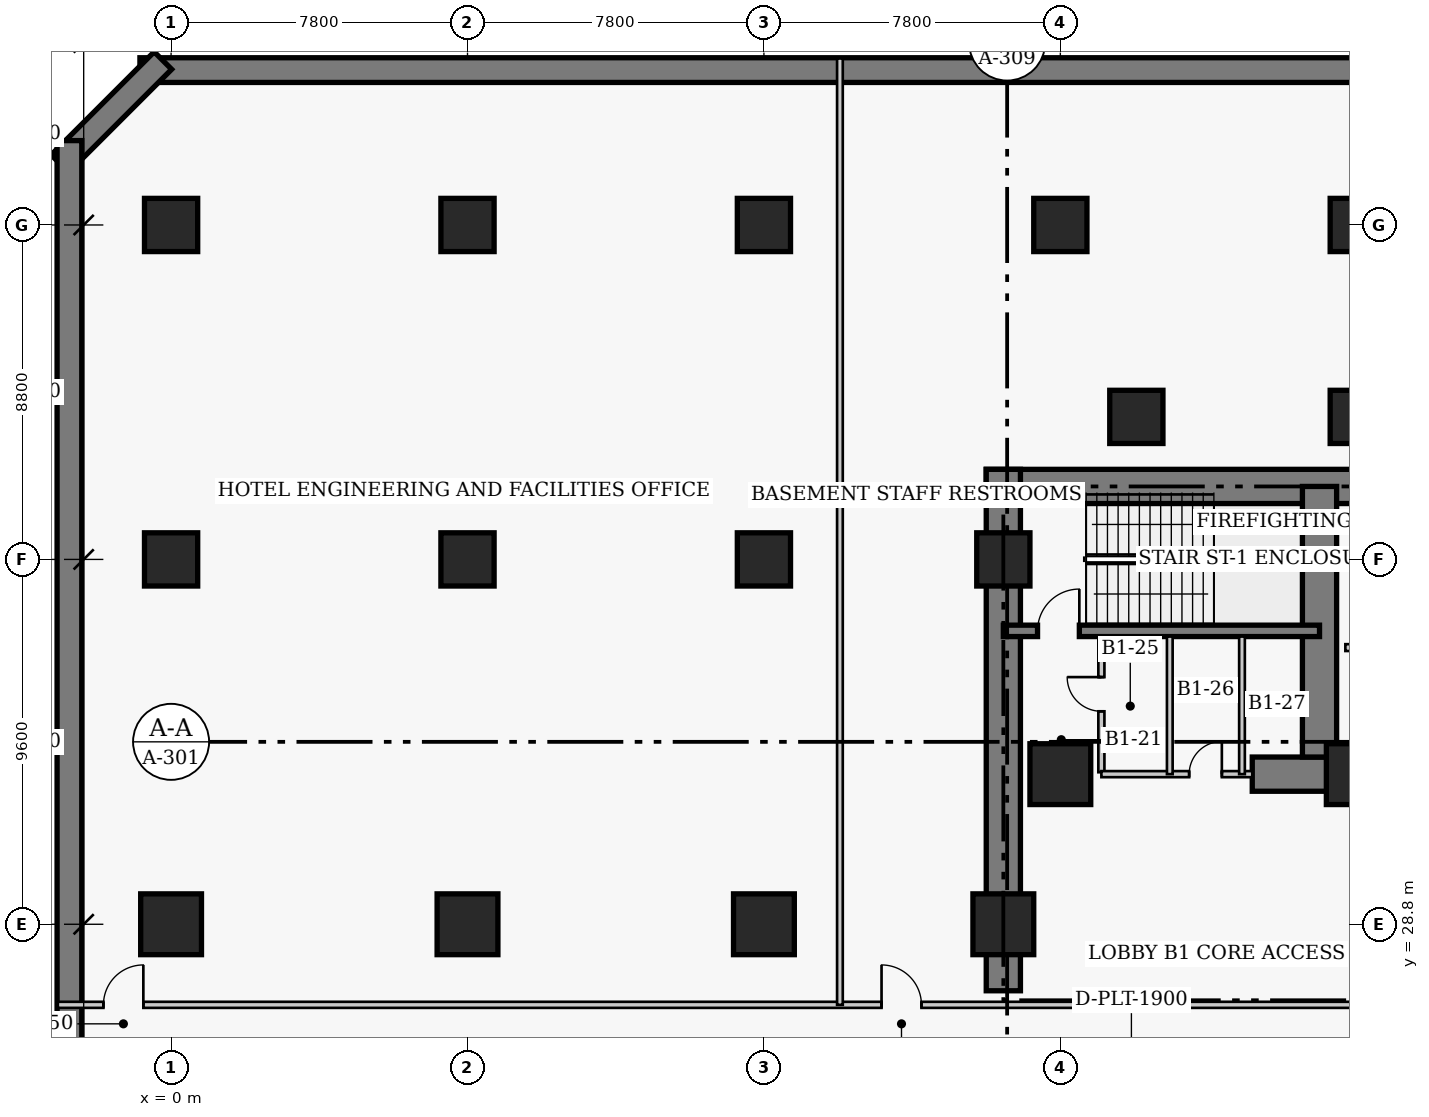
"""IFC4 building model, lengths in metres.
Left out: names, types, materials, properties, quantities, classifications, styles, units other than length and angle.
Written with IfcOpenShell. Run it as: python <this file> out.ifc"""

import sys

from ifc_helpers import new_model, si_unit, direction, frame, frame_2d, origin, origin_2d, place, context, subcontext, project, spatial, rectangle, extrude, element, fill, save


model = new_model("IFC4")
c1 = context("Model", 3, precision=1e-05, world=origin(), true_north=direction((0.0, 1.0)))
c2 = subcontext(c1, "Body", "Model", "MODEL_VIEW")
j1 = project(units=[si_unit("LENGTHUNIT", "METRE"), si_unit("PLANEANGLEUNIT", "RADIAN")], contexts=[c1])
p1 = place(None, origin())
s1 = spatial("IfcSite", under=j1, at=p1, CompositionType="ELEMENT")
p2 = place(p1, origin())
s2 = spatial("IfcBuilding", under=s1, at=p2, CompositionType="ELEMENT")
p3 = place(p2, frame((0.0, 0.0, -4.5)))
s3 = spatial("IfcBuildingStorey", under=s2, at=p3, CompositionType="ELEMENT", Elevation=-4.5)
p4 = place(p3, frame((78.82, 51.275, 0.0), z_axis=(0.0, 0.0, 1.0), x_axis=(-1.0, 0.0, 0.0)))
e1 = element("IfcWall", 1, at=p4, inside=s3, PredefinedType="USERDEFINED", context=c2, shape_type="SweptSolid", body=[
    extrude(rectangle(XDim=79.64, YDim=0.65, at=frame_2d((39.82, 0.0))), origin(), (0.0, 0.0, 1.0), 4.15),
])
p5 = place(p3, frame((-0.215, 51.526, 0.0), z_axis=(0.0, 0.0, 1.0), x_axis=(-0.707106781187, -0.707106781187, 0.0)))
e2 = element("IfcWall", 2, at=p5, inside=s3, PredefinedType="USERDEFINED", context=c2, shape_type="SweptSolid", body=[
    extrude(rectangle(XDim=3.834, YDim=0.65, at=frame_2d((1.917, 0.0))), origin(), (0.0, 0.0, 1.0), 4.15),
])
p6 = place(p3, frame((-2.675, 49.42, 0.0), z_axis=(0.0, 0.0, 1.0), x_axis=(0.0, -1.0, 0.0)))
e3 = element("IfcWall", 3, at=p6, inside=s3, PredefinedType="USERDEFINED", context=c2, shape_type="SweptSolid", body=[
    extrude(rectangle(XDim=46.84, YDim=0.65, at=frame_2d((23.42, 0.0))), origin(), (0.0, 0.0, 1.0), 4.15),
])
p7 = place(p3, frame((21.45, 40.32, 0.0), z_axis=(0.0, 0.0, 1.0), x_axis=(1.0, 0.0, 0.0)))
e4 = element("IfcWall", 4, at=p7, inside=s3, PredefinedType="SHEAR", context=c2, shape_type="SweptSolid", body=[
    extrude(rectangle(XDim=14.4, YDim=0.9, at=frame_2d((7.2, 0.0))), origin(), (0.0, 0.0, 1.0), 4.5),
])
p8 = place(p3, frame((21.9, 27.05, 0.0), z_axis=(0.0, 0.0, 1.0), x_axis=(0.0, 1.0, 0.0)))
e5 = element("IfcWall", 5, at=p8, inside=s3, PredefinedType="SHEAR", context=c2, shape_type="SweptSolid", body=[
    extrude(rectangle(XDim=13.72, YDim=0.9, at=frame_2d((6.86, 0.0))), origin(), (0.0, 0.0, 1.0), 4.5),
])
p9 = place(p3, frame((28.45, 32.75, 0.0), z_axis=(0.0, 0.0, 1.0), x_axis=(1.0, 0.0, 0.0)))
e6 = element("IfcWall", 6, at=p9, inside=s3, PredefinedType="SHEAR", context=c2, shape_type="SweptSolid", body=[
    extrude(rectangle(XDim=2.4, YDim=0.9, at=frame_2d((1.2, 0.0))), origin(), (0.0, 0.0, 1.0), 4.5),
])
p10 = place(p3, frame((30.22, 33.2, 0.0), z_axis=(0.0, 0.0, 1.0), x_axis=(0.0, 1.0, 0.0)))
e7 = element("IfcWall", 7, at=p10, inside=s3, PredefinedType="SHEAR", context=c2, shape_type="SweptSolid", body=[
    extrude(rectangle(XDim=7.12, YDim=0.9, at=frame_2d((3.56, 0.0))), origin(), (0.0, 0.0, 1.0), 4.5),
])
p11 = place(p3, frame((21.9, 36.52, 0.0), z_axis=(0.0, 0.0, 1.0), x_axis=(1.0, 0.0, 0.0)))
e8 = element("IfcWall", 8, at=p11, inside=s3, PredefinedType="SHEAR", context=c2, shape_type="SweptSolid", body=[
    extrude(rectangle(XDim=8.32, YDim=0.3, at=frame_2d((4.16, 0.0))), origin(), (0.0, 0.0, 1.0), 4.5),
])
p12 = place(p11, frame((0.9, 0.0, 0.0)))
e9 = element("IfcOpeningElement", 9, at=p12, cuts=e8, PredefinedType="OPENING", context=c2, shape_type="SweptSolid", body=[
    extrude(rectangle(XDim=1.1, YDim=2.15, at=frame_2d((0.55, 1.075))), frame((0.0, 0.16, 0.0), z_axis=(0.0, -1.0, 0.0), x_axis=(1.0, 0.0, 0.0)), (0.0, 0.0, 1.0), 0.32),
])
p13 = place(p3, frame((0.0, 28.8, 0.0), z_axis=(0.0, 0.0, 1.0), x_axis=(1.0, 0.0, 0.0)))
e10 = element("IfcColumn", 10, at=p13, inside=s3, PredefinedType="COLUMN", context=c2, shape_type="SweptSolid", body=[
    extrude(rectangle(XDim=1.6, YDim=1.6, at=origin_2d()), origin(), (0.0, 0.0, 1.0), 4.5),
])
for number, where, z_axis, x_axis in (
    (11, (0.0, 38.4, 0.0), (0.0, 0.0, 1.0), (1.0, 0.0, 0.0)),
    (12, (0.0, 47.2, 0.0), (0.0, 0.0, 1.0), (1.0, 0.0, 0.0)),
):
    element("IfcColumn", number, at=place(p3, frame(where, z_axis=z_axis, x_axis=x_axis)), inside=s3, PredefinedType="COLUMN", context=c2, shape_type="SweptSolid", body=[
        extrude(rectangle(XDim=1.4, YDim=1.4, at=origin_2d()), origin(), (0.0, 0.0, 1.0), 4.5),
    ])
p14 = place(p3, frame((7.8, 28.8, 0.0), z_axis=(0.0, 0.0, 1.0), x_axis=(1.0, 0.0, 0.0)))
e13 = element("IfcColumn", 13, at=p14, inside=s3, PredefinedType="COLUMN", context=c2, shape_type="SweptSolid", body=[
    extrude(rectangle(XDim=1.6, YDim=1.6, at=origin_2d()), origin(), (0.0, 0.0, 1.0), 4.5),
])
for number, where, z_axis, x_axis in (
    (14, (7.8, 38.4, 0.0), (0.0, 0.0, 1.0), (1.0, 0.0, 0.0)),
    (15, (7.8, 47.2, 0.0), (0.0, 0.0, 1.0), (1.0, 0.0, 0.0)),
):
    element("IfcColumn", number, at=place(p3, frame(where, z_axis=z_axis, x_axis=x_axis)), inside=s3, PredefinedType="COLUMN", context=c2, shape_type="SweptSolid", body=[
        extrude(rectangle(XDim=1.4, YDim=1.4, at=origin_2d()), origin(), (0.0, 0.0, 1.0), 4.5),
    ])
p15 = place(p3, frame((15.6, 28.8, 0.0), z_axis=(0.0, 0.0, 1.0), x_axis=(1.0, 0.0, 0.0)))
e16 = element("IfcColumn", 16, at=p15, inside=s3, PredefinedType="COLUMN", context=c2, shape_type="SweptSolid", body=[
    extrude(rectangle(XDim=1.6, YDim=1.6, at=origin_2d()), origin(), (0.0, 0.0, 1.0), 4.5),
])
for number, where, z_axis, x_axis in (
    (17, (15.6, 38.4, 0.0), (0.0, 0.0, 1.0), (1.0, 0.0, 0.0)),
    (18, (15.6, 47.2, 0.0), (0.0, 0.0, 1.0), (1.0, 0.0, 0.0)),
    (19, (23.4, 47.2, 0.0), (0.0, 0.0, 1.0), (1.0, 0.0, 0.0)),
    (20, (31.2, 47.2, 0.0), (0.0, 0.0, 1.0), (1.0, 0.0, 0.0)),
):
    element("IfcColumn", number, at=place(p3, frame(where, z_axis=z_axis, x_axis=x_axis)), inside=s3, PredefinedType="COLUMN", context=c2, shape_type="SweptSolid", body=[
        extrude(rectangle(XDim=1.4, YDim=1.4, at=origin_2d()), origin(), (0.0, 0.0, 1.0), 4.5),
    ])
p16 = place(p3, frame((21.9, 28.8, 0.0), z_axis=(0.0, 0.0, 1.0), x_axis=(1.0, 0.0, 0.0)))
e21 = element("IfcColumn", 21, at=p16, inside=s3, PredefinedType="COLUMN", context=c2, shape_type="SweptSolid", body=[
    extrude(rectangle(XDim=1.6, YDim=1.6, at=origin_2d()), origin(), (0.0, 0.0, 1.0), 4.5),
])
p17 = place(p3, frame((21.9, 38.4, 0.0), z_axis=(0.0, 0.0, 1.0), x_axis=(1.0, 0.0, 0.0)))
e22 = element("IfcColumn", 22, at=p17, inside=s3, PredefinedType="COLUMN", context=c2, shape_type="SweptSolid", body=[
    extrude(rectangle(XDim=1.4, YDim=1.4, at=origin_2d()), origin(), (0.0, 0.0, 1.0), 4.5),
])
for number, where, z_axis, x_axis in (
    (23, (23.4, 32.75, 0.0), (0.0, 0.0, 1.0), (1.0, 0.0, 0.0)),
    (24, (31.2, 32.75, 0.0), (0.0, 0.0, 1.0), (1.0, 0.0, 0.0)),
):
    element("IfcColumn", number, at=place(p3, frame(where, z_axis=z_axis, x_axis=x_axis)), inside=s3, PredefinedType="COLUMN", context=c2, shape_type="SweptSolid", body=[
        extrude(rectangle(XDim=1.6, YDim=1.6, at=origin_2d()), origin(), (0.0, 0.0, 1.0), 4.5),
    ])
for number, where, z_axis, x_axis in (
    (25, (25.4, 42.15, 0.0), (0.0, 0.0, 1.0), (1.0, 0.0, 0.0)),
    (26, (31.2, 42.15, 0.0), (0.0, 0.0, 1.0), (1.0, 0.0, 0.0)),
):
    element("IfcColumn", number, at=place(p3, frame(where, z_axis=z_axis, x_axis=x_axis)), inside=s3, PredefinedType="COLUMN", context=c2, shape_type="SweptSolid", body=[
        extrude(rectangle(XDim=1.4, YDim=1.4, at=origin_2d()), origin(), (0.0, 0.0, 1.0), 4.5),
    ])
p18 = place(p3, frame((30.9, 36.08, 0.0), z_axis=(0.0, 0.0, 1.0), x_axis=(1.0, 0.0, 0.0)))
e27 = element("IfcWall", 27, at=p18, inside=s3, PredefinedType="PARTITIONING", context=c2, shape_type="SweptSolid", body=[
    extrude(rectangle(XDim=1.85, YDim=0.18, at=frame_2d((0.925, 0.0))), origin(), (0.0, 0.0, 1.0), 4.15),
])
p19 = place(p18, frame((0.48, 0.0, 0.0)))
e28 = element("IfcOpeningElement", 28, at=p19, cuts=e27, PredefinedType="OPENING", context=c2, shape_type="SweptSolid", body=[
    extrude(rectangle(XDim=0.9, YDim=2.15, at=frame_2d((0.45, 1.075))), frame((0.0, 0.1, 0.0), z_axis=(0.0, -1.0, 0.0), x_axis=(1.0, 0.0, 0.0)), (0.0, 0.0, 1.0), 0.2),
])
p20 = place(p3, frame((24.48, 32.8, 0.0), z_axis=(0.0, 0.0, 1.0), x_axis=(0.0, 1.0, 0.0)))
e29 = element("IfcWall", 29, at=p20, inside=s3, PredefinedType="PARTITIONING", context=c2, shape_type="SweptSolid", body=[
    extrude(rectangle(XDim=3.57, YDim=0.16, at=frame_2d((1.785, 0.0))), origin(), (0.0, 0.0, 1.0), 4.15),
])
p21 = place(p20, frame((1.604, 0.0, 0.0)))
e30 = element("IfcOpeningElement", 30, at=p21, cuts=e29, PredefinedType="OPENING", context=c2, shape_type="SweptSolid", body=[
    extrude(rectangle(XDim=0.9, YDim=2.1, at=frame_2d((0.45, 1.05))), frame((0.0, 0.09, 0.0), z_axis=(0.0, -1.0, 0.0), x_axis=(1.0, 0.0, 0.0)), (0.0, 0.0, 1.0), 0.18),
])
p22 = place(p3, frame((24.48, 32.75, 0.0), z_axis=(0.0, 0.0, 1.0), x_axis=(1.0, 0.0, 0.0)))
e31 = element("IfcWall", 31, at=p22, inside=s3, PredefinedType="PARTITIONING", context=c2, shape_type="SweptSolid", body=[
    extrude(rectangle(XDim=3.97, YDim=0.16, at=frame_2d((1.985, 0.0))), origin(), (0.0, 0.0, 1.0), 4.15),
])
p23 = place(p22, frame((2.31, 0.0, 0.0)))
e32 = element("IfcOpeningElement", 32, at=p23, cuts=e31, PredefinedType="OPENING", context=c2, shape_type="SweptSolid", body=[
    extrude(rectangle(XDim=0.86, YDim=2.05, at=frame_2d((0.43, 1.025))), frame((0.0, 0.09, 0.0), z_axis=(0.0, -1.0, 0.0), x_axis=(1.0, 0.0, 0.0)), (0.0, 0.0, 1.0), 0.18),
])
for number, where, z_axis, x_axis in (
    (33, (26.28, 32.75, 0.0), (0.0, 0.0, 1.0), (0.0, 1.0, 0.0)),
    (34, (28.18, 32.75, 0.0), (0.0, 0.0, 1.0), (0.0, 1.0, 0.0)),
):
    element("IfcWall", number, at=place(p3, frame(where, z_axis=z_axis, x_axis=x_axis)), inside=s3, PredefinedType="PARTITIONING", context=c2, shape_type="SweptSolid", body=[
        extrude(rectangle(XDim=3.62, YDim=0.15, at=frame_2d((1.81, 0.0))), origin(), (0.0, 0.0, 1.0), 4.15),
    ])
p24 = place(p3, frame((-2.98, 26.68, 0.0), z_axis=(0.0, 0.0, 1.0), x_axis=(1.0, 0.0, 0.0)))
e35 = element("IfcWall", 35, at=p24, inside=s3, PredefinedType="PARTITIONING", context=c2, shape_type="SweptSolid", body=[
    extrude(rectangle(XDim=83.96, YDim=0.16, at=frame_2d((41.98, 0.0))), origin(), (0.0, 0.0, 1.0), 4.15),
])
p25 = place(p24, frame((37.016, 0.0, 0.0)))
e36 = element("IfcOpeningElement", 36, at=p25, cuts=e35, PredefinedType="OPENING", context=c2, shape_type="SweptSolid", body=[
    extrude(rectangle(XDim=1.8, YDim=2.2, at=frame_2d((0.9, 1.1))), frame((0.0, 0.09, 0.0), z_axis=(0.0, -1.0, 0.0), x_axis=(1.0, 0.0, 0.0)), (0.0, 0.0, 1.0), 0.18),
])
p26 = place(p24, frame((1.2, 0.0, 0.0)))
e37 = element("IfcOpeningElement", 37, at=p26, cuts=e35, PredefinedType="OPENING", context=c2, shape_type="SweptSolid", body=[
    extrude(rectangle(XDim=1.05, YDim=2.15, at=frame_2d((0.525, 1.075))), frame((0.0, 0.09, 0.0), z_axis=(0.0, -1.0, 0.0), x_axis=(1.0, 0.0, 0.0)), (0.0, 0.0, 1.0), 0.18),
])
p27 = place(p24, frame((21.675, 0.0, 0.0)))
e38 = element("IfcOpeningElement", 38, at=p27, cuts=e35, PredefinedType="OPENING", context=c2, shape_type="SweptSolid", body=[
    extrude(rectangle(XDim=1.05, YDim=2.15, at=frame_2d((0.525, 1.075))), frame((0.0, 0.09, 0.0), z_axis=(0.0, -1.0, 0.0), x_axis=(1.0, 0.0, 0.0)), (0.0, 0.0, 1.0), 0.18),
])
p28 = place(p24, frame((70.925, 0.0, 0.0)))
e39 = element("IfcOpeningElement", 39, at=p28, cuts=e35, PredefinedType="OPENING", context=c2, shape_type="SweptSolid", body=[
    extrude(rectangle(XDim=1.05, YDim=2.15, at=frame_2d((0.525, 1.075))), frame((0.0, 0.09, 0.0), z_axis=(0.0, -1.0, 0.0), x_axis=(1.0, 0.0, 0.0)), (0.0, 0.0, 1.0), 0.18),
])
p29 = place(p3, frame((17.6, 26.68, 0.0), z_axis=(0.0, 0.0, 1.0), x_axis=(0.0, 1.0, 0.0)))
e40 = element("IfcWall", 40, at=p29, inside=s3, PredefinedType="PARTITIONING", context=c2, shape_type="SweptSolid", body=[
    extrude(rectangle(XDim=24.9, YDim=0.15, at=frame_2d((12.45, 0.0))), origin(), (0.0, 0.0, 1.0), 4.15),
])
p30 = place(p21, origin())
e41 = element("IfcDoor", 41, at=p30, inside=s3, OperationType="SINGLE_SWING_RIGHT", PredefinedType="DOOR", context=c2, shape_type="SweptSolid", body=[
    extrude(rectangle(XDim=0.9, YDim=2.1, at=frame_2d((0.45, 1.05))), frame((0.0, 0.025, 0.0), z_axis=(0.0, -1.0, 0.0), x_axis=(1.0, 0.0, 0.0)), (0.0, 0.0, 1.0), 0.05),
])
fill(e30, e41)
p31 = place(p23, origin())
e42 = element("IfcDoor", 42, at=p31, inside=s3, OperationType="SINGLE_SWING_RIGHT", PredefinedType="DOOR", context=c2, shape_type="SweptSolid", body=[
    extrude(rectangle(XDim=0.86, YDim=2.05, at=frame_2d((0.43, 1.025))), frame((0.0, 0.025, 0.0), z_axis=(0.0, -1.0, 0.0), x_axis=(1.0, 0.0, 0.0)), (0.0, 0.0, 1.0), 0.05),
])
fill(e32, e42)
p32 = place(p26, origin())
e43 = element("IfcDoor", 43, at=p32, inside=s3, OperationType="SINGLE_SWING_RIGHT", PredefinedType="DOOR", context=c2, shape_type="SweptSolid", body=[
    extrude(rectangle(XDim=1.05, YDim=2.15, at=frame_2d((0.525, 1.075))), frame((0.0, 0.025, 0.0), z_axis=(0.0, -1.0, 0.0), x_axis=(1.0, 0.0, 0.0)), (0.0, 0.0, 1.0), 0.05),
])
fill(e37, e43)
p33 = place(p27, origin())
e44 = element("IfcDoor", 44, at=p33, inside=s3, OperationType="SINGLE_SWING_LEFT", PredefinedType="DOOR", context=c2, shape_type="SweptSolid", body=[
    extrude(rectangle(XDim=1.05, YDim=2.15, at=frame_2d((0.525, 1.075))), frame((0.0, 0.025, 0.0), z_axis=(0.0, -1.0, 0.0), x_axis=(1.0, 0.0, 0.0)), (0.0, 0.0, 1.0), 0.05),
])
fill(e38, e44)
p34 = place(p12, origin())
e45 = element("IfcDoor", 45, at=p34, inside=s3, OperationType="SINGLE_SWING_RIGHT", PredefinedType="DOOR", context=c2, shape_type="SweptSolid", body=[
    extrude(rectangle(XDim=1.1, YDim=2.15, at=frame_2d((0.55, 1.075))), frame((0.0, 0.025, 0.0), z_axis=(0.0, -1.0, 0.0), x_axis=(1.0, 0.0, 0.0)), (0.0, 0.0, 1.0), 0.05),
])
fill(e9, e45)
save(model, sys.argv[1])
